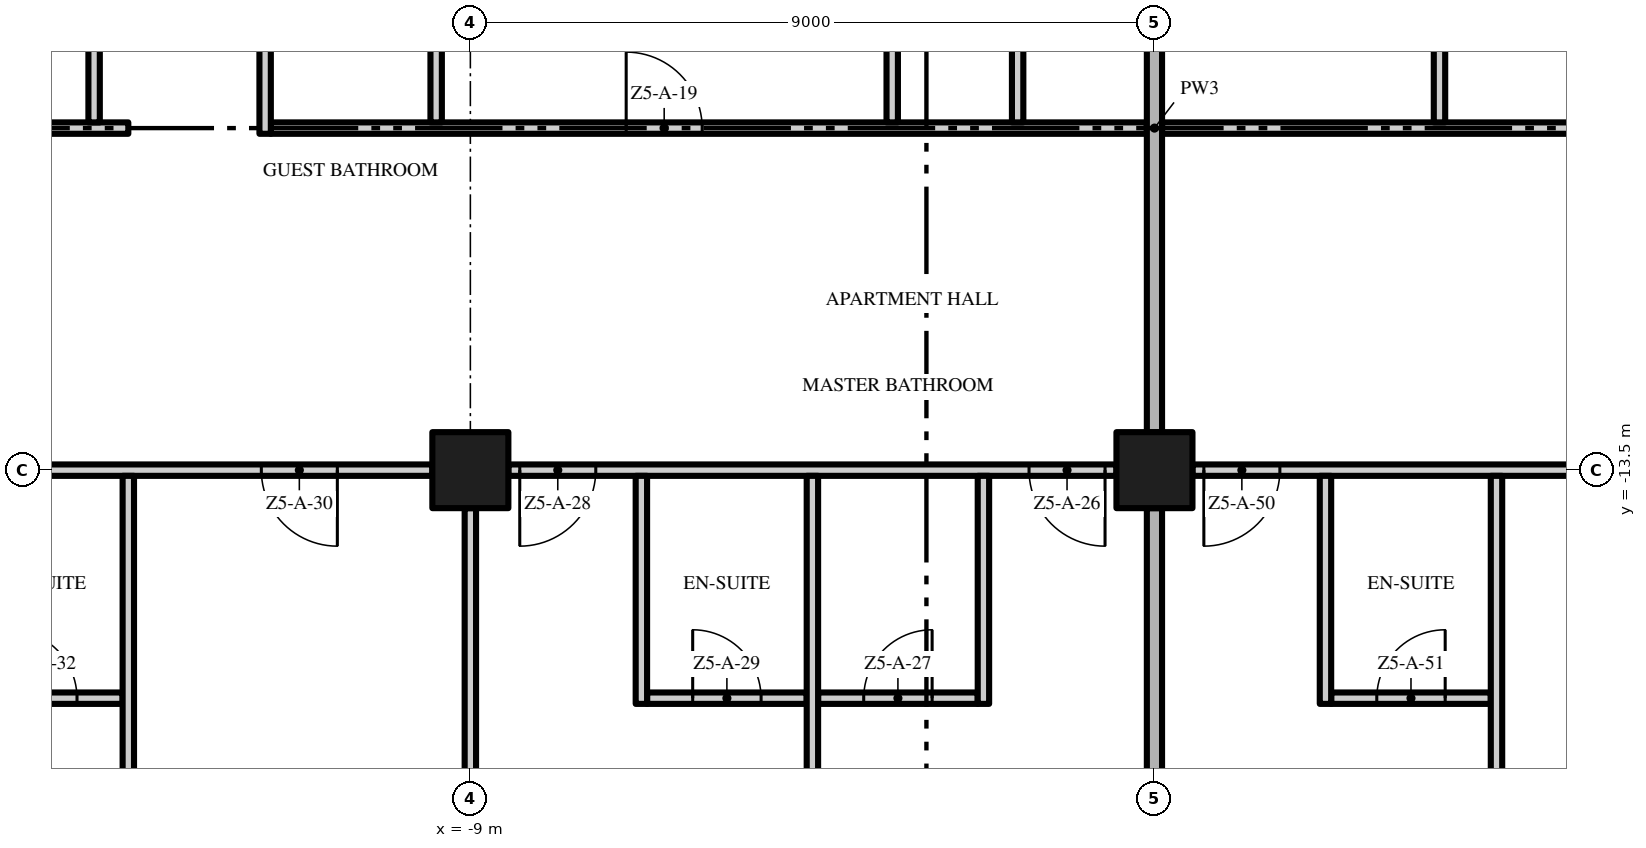
"""IFC4 building model, lengths in metres.
Left out: names, types, materials, properties, quantities, classifications, styles, units other than length and angle.
Written with IfcOpenShell. Run it as: python <this file> out.ifc"""

import sys

from ifc_helpers import new_model, si_unit, direction, frame, frame_2d, origin, origin_2d, place, context, subcontext, project, spatial, rectangle, extrude, element, fill, save


model = new_model("IFC4")
c1 = context("Model", 3, precision=1e-05, world=origin(), true_north=direction((0.0, 1.0)))
c2 = subcontext(c1, "Body", "Model", "MODEL_VIEW")
j1 = project(units=[si_unit("LENGTHUNIT", "METRE"), si_unit("PLANEANGLEUNIT", "RADIAN")], contexts=[c1])
p1 = place(None, origin())
s1 = spatial("IfcSite", under=j1, at=p1, CompositionType="ELEMENT")
p2 = place(p1, origin())
s2 = spatial("IfcBuilding", under=s1, at=p2, CompositionType="ELEMENT")
p3 = place(p2, frame((0.0, 0.0, 238.8)))
s3 = spatial("IfcBuildingStorey", under=s2, at=p3, CompositionType="ELEMENT", Elevation=238.8)
for number, where, z_axis, x_axis in (
    (1, (-9.0, -13.5, 0.0), (0.0, 0.0, 1.0), (1.0, 0.0, 0.0)),
    (2, (0.0, -13.5, 0.0), (0.0, 0.0, 1.0), (1.0, 0.0, 0.0)),
):
    element("IfcColumn", number, at=place(p3, frame(where, z_axis=z_axis, x_axis=x_axis)), inside=s3, PredefinedType="COLUMN", context=c2, shape_type="SweptSolid", body=[
        extrude(rectangle(XDim=1.0, YDim=1.0, at=origin_2d()), origin(), (0.0, 0.0, 1.0), 3.5),
    ])
p4 = place(p3, frame((-15.675, -16.5, 0.0), z_axis=(0.0, 0.0, 1.0), x_axis=(1.0, 0.0, 0.0)))
e3 = element("IfcWall", 3, at=p4, inside=s3, PredefinedType="PARTITIONING", context=c2, shape_type="SweptSolid", body=[
    extrude(rectangle(XDim=2.1, YDim=0.15, at=frame_2d((1.05, 0.0))), origin(), (0.0, 0.0, 1.0), 3.5),
])
p5 = place(p4, frame((0.6, 0.0, 0.0)))
e4 = element("IfcOpeningElement", 4, at=p5, cuts=e3, PredefinedType="OPENING", context=c2, shape_type="SweptSolid", body=[
    extrude(rectangle(XDim=0.9, YDim=2.1, at=frame_2d((0.45, 1.05))), frame((0.0, 0.085, 0.0), z_axis=(0.0, -1.0, 0.0), x_axis=(1.0, 0.0, 0.0)), (0.0, 0.0, 1.0), 0.17),
])
p6 = place(p3, frame((-6.675, -16.5, 0.0), z_axis=(0.0, 0.0, 1.0), x_axis=(1.0, 0.0, 0.0)))
e5 = element("IfcWall", 5, at=p6, inside=s3, PredefinedType="PARTITIONING", context=c2, shape_type="SweptSolid", body=[
    extrude(rectangle(XDim=2.1, YDim=0.15, at=frame_2d((1.05, 0.0))), origin(), (0.0, 0.0, 1.0), 3.5),
])
p7 = place(p6, frame((0.6, 0.0, 0.0)))
e6 = element("IfcOpeningElement", 6, at=p7, cuts=e5, PredefinedType="OPENING", context=c2, shape_type="SweptSolid", body=[
    extrude(rectangle(XDim=0.9, YDim=2.1, at=frame_2d((0.45, 1.05))), frame((0.0, 0.085, 0.0), z_axis=(0.0, -1.0, 0.0), x_axis=(1.0, 0.0, 0.0)), (0.0, 0.0, 1.0), 0.17),
])
p8 = place(p3, frame((-4.425, -16.5, 0.0), z_axis=(0.0, 0.0, 1.0), x_axis=(1.0, 0.0, 0.0)))
e7 = element("IfcWall", 7, at=p8, inside=s3, PredefinedType="PARTITIONING", context=c2, shape_type="SweptSolid", body=[
    extrude(rectangle(XDim=2.1, YDim=0.15, at=frame_2d((1.05, 0.0))), origin(), (0.0, 0.0, 1.0), 3.5),
])
p9 = place(p8, frame((0.6, 0.0, 0.0)))
e8 = element("IfcOpeningElement", 8, at=p9, cuts=e7, PredefinedType="OPENING", context=c2, shape_type="SweptSolid", body=[
    extrude(rectangle(XDim=0.9, YDim=2.1, at=frame_2d((0.45, 1.05))), frame((0.0, 0.085, 0.0), z_axis=(0.0, -1.0, 0.0), x_axis=(1.0, 0.0, 0.0)), (0.0, 0.0, 1.0), 0.17),
])
p10 = place(p3, frame((2.325, -16.5, 0.0), z_axis=(0.0, 0.0, 1.0), x_axis=(1.0, 0.0, 0.0)))
e9 = element("IfcWall", 9, at=p10, inside=s3, PredefinedType="PARTITIONING", context=c2, shape_type="SweptSolid", body=[
    extrude(rectangle(XDim=2.1, YDim=0.15, at=frame_2d((1.05, 0.0))), origin(), (0.0, 0.0, 1.0), 3.5),
])
p11 = place(p10, frame((0.6, 0.0, 0.0)))
e10 = element("IfcOpeningElement", 10, at=p11, cuts=e9, PredefinedType="OPENING", context=c2, shape_type="SweptSolid", body=[
    extrude(rectangle(XDim=0.9, YDim=2.1, at=frame_2d((0.45, 1.05))), frame((0.0, 0.085, 0.0), z_axis=(0.0, -1.0, 0.0), x_axis=(1.0, 0.0, 0.0)), (0.0, 0.0, 1.0), 0.17),
])
p12 = place(p3, frame((-9.5, -13.5, 0.0), z_axis=(0.0, 0.0, 1.0), x_axis=(-1.0, 0.0, 0.0)))
e11 = element("IfcWall", 11, at=p12, inside=s3, PredefinedType="PARTITIONING", context=c2, shape_type="SweptSolid", body=[
    extrude(rectangle(XDim=8.0, YDim=0.15, at=frame_2d((4.0, 0.0))), origin(), (0.0, 0.0, 1.0), 3.5),
])
p13 = place(p12, frame((1.25, 0.0, 0.0)))
e12 = element("IfcOpeningElement", 12, at=p13, cuts=e11, PredefinedType="OPENING", context=c2, shape_type="SweptSolid", body=[
    extrude(rectangle(XDim=1.0, YDim=2.4, at=frame_2d((0.5, 1.2))), frame((0.0, 0.085, 0.0), z_axis=(0.0, -1.0, 0.0), x_axis=(1.0, 0.0, 0.0)), (0.0, 0.0, 1.0), 0.17),
])
p14 = place(p12, frame((6.85, 0.0, 0.0)))
e13 = element("IfcOpeningElement", 13, at=p14, cuts=e11, PredefinedType="OPENING", context=c2, shape_type="SweptSolid", body=[
    extrude(rectangle(XDim=1.0, YDim=2.4, at=frame_2d((0.5, 1.2))), frame((0.0, 0.085, 0.0), z_axis=(0.0, -1.0, 0.0), x_axis=(1.0, 0.0, 0.0)), (0.0, 0.0, 1.0), 0.17),
])
p15 = place(p3, frame((-0.5, -13.5, 0.0), z_axis=(0.0, 0.0, 1.0), x_axis=(-1.0, 0.0, 0.0)))
e14 = element("IfcWall", 14, at=p15, inside=s3, PredefinedType="PARTITIONING", context=c2, shape_type="SweptSolid", body=[
    extrude(rectangle(XDim=8.0, YDim=0.15, at=frame_2d((4.0, 0.0))), origin(), (0.0, 0.0, 1.0), 3.5),
])
p16 = place(p15, frame((0.15, 0.0, 0.0)))
e15 = element("IfcOpeningElement", 15, at=p16, cuts=e14, PredefinedType="OPENING", context=c2, shape_type="SweptSolid", body=[
    extrude(rectangle(XDim=1.0, YDim=2.4, at=frame_2d((0.5, 1.2))), frame((0.0, 0.085, 0.0), z_axis=(0.0, -1.0, 0.0), x_axis=(1.0, 0.0, 0.0)), (0.0, 0.0, 1.0), 0.17),
])
p17 = place(p15, frame((6.85, 0.0, 0.0)))
e16 = element("IfcOpeningElement", 16, at=p17, cuts=e14, PredefinedType="OPENING", context=c2, shape_type="SweptSolid", body=[
    extrude(rectangle(XDim=1.0, YDim=2.4, at=frame_2d((0.5, 1.2))), frame((0.0, 0.085, 0.0), z_axis=(0.0, -1.0, 0.0), x_axis=(1.0, 0.0, 0.0)), (0.0, 0.0, 1.0), 0.17),
])
p18 = place(p3, frame((8.5, -13.5, 0.0), z_axis=(0.0, 0.0, 1.0), x_axis=(-1.0, 0.0, 0.0)))
e17 = element("IfcWall", 17, at=p18, inside=s3, PredefinedType="PARTITIONING", context=c2, shape_type="SweptSolid", body=[
    extrude(rectangle(XDim=8.0, YDim=0.15, at=frame_2d((4.0, 0.0))), origin(), (0.0, 0.0, 1.0), 3.5),
])
p19 = place(p18, frame((1.25, 0.0, 0.0)))
e18 = element("IfcOpeningElement", 18, at=p19, cuts=e17, PredefinedType="OPENING", context=c2, shape_type="SweptSolid", body=[
    extrude(rectangle(XDim=1.0, YDim=2.4, at=frame_2d((0.5, 1.2))), frame((0.0, 0.085, 0.0), z_axis=(0.0, -1.0, 0.0), x_axis=(1.0, 0.0, 0.0)), (0.0, 0.0, 1.0), 0.17),
])
p20 = place(p18, frame((6.85, 0.0, 0.0)))
e19 = element("IfcOpeningElement", 19, at=p20, cuts=e17, PredefinedType="OPENING", context=c2, shape_type="SweptSolid", body=[
    extrude(rectangle(XDim=1.0, YDim=2.4, at=frame_2d((0.5, 1.2))), frame((0.0, 0.085, 0.0), z_axis=(0.0, -1.0, 0.0), x_axis=(1.0, 0.0, 0.0)), (0.0, 0.0, 1.0), 0.17),
])
p21 = place(p3, frame((-26.7, -9.0, 0.0), z_axis=(0.0, 0.0, 1.0), x_axis=(1.0, 0.0, 0.0)))
e20 = element("IfcWall", 20, at=p21, inside=s3, PredefinedType="PARTITIONING", context=c2, shape_type="SweptSolid", body=[
    extrude(rectangle(XDim=13.2, YDim=0.15, at=frame_2d((6.6, 0.0))), origin(), (0.0, 0.0, 1.0), 3.5),
])
p22 = place(p3, frame((-11.625, -9.0, 0.0), z_axis=(0.0, 0.0, 1.0), x_axis=(1.0, 0.0, 0.0)))
e21 = element("IfcWall", 21, at=p22, inside=s3, PredefinedType="PARTITIONING", context=c2, shape_type="SweptSolid", body=[
    extrude(rectangle(XDim=11.525, YDim=0.15, at=frame_2d((5.763, 0.0))), origin(), (0.0, 0.0, 1.0), 3.5),
])
p23 = place(p22, frame((4.675, 0.0, 0.0)))
e22 = element("IfcOpeningElement", 22, at=p23, cuts=e21, PredefinedType="OPENING", context=c2, shape_type="SweptSolid", body=[
    extrude(rectangle(XDim=1.0, YDim=2.4, at=frame_2d((0.5, 1.2))), frame((0.0, 0.085, 0.0), z_axis=(0.0, -1.0, 0.0), x_axis=(1.0, 0.0, 0.0)), (0.0, 0.0, 1.0), 0.17),
])
p24 = place(p3, frame((0.1, -9.0, 0.0), z_axis=(0.0, 0.0, 1.0), x_axis=(1.0, 0.0, 0.0)))
e23 = element("IfcWall", 23, at=p24, inside=s3, PredefinedType="PARTITIONING", context=c2, shape_type="SweptSolid", body=[
    extrude(rectangle(XDim=8.825, YDim=0.15, at=frame_2d((4.412, 0.0))), origin(), (0.0, 0.0, 1.0), 3.5),
])
p25 = place(p24, frame((5.8, 0.0, 0.0)))
e24 = element("IfcOpeningElement", 24, at=p25, cuts=e23, PredefinedType="OPENING", context=c2, shape_type="SweptSolid", body=[
    extrude(rectangle(XDim=0.9, YDim=2.1, at=frame_2d((0.45, 1.05))), frame((0.0, 0.085, 0.0), z_axis=(0.0, -1.0, 0.0), x_axis=(1.0, 0.0, 0.0)), (0.0, 0.0, 1.0), 0.17),
])
p26 = place(p3, frame((-13.95, -8.925, 0.0), z_axis=(0.0, 0.0, 1.0), x_axis=(0.0, 1.0, 0.0)))
e25 = element("IfcWall", 25, at=p26, inside=s3, PredefinedType="PARTITIONING", context=c2, shape_type="SweptSolid", body=[
    extrude(rectangle(XDim=4.5, YDim=0.15, at=frame_2d((2.25, 0.0))), origin(), (0.0, 0.0, 1.0), 3.5),
])
p27 = place(p3, frame((-13.5, -22.2, 0.0), z_axis=(0.0, 0.0, 1.0), x_axis=(0.0, 1.0, 0.0)))
e26 = element("IfcWall", 26, at=p27, inside=s3, PredefinedType="PARTITIONING", context=c2, shape_type="SweptSolid", body=[
    extrude(rectangle(XDim=8.625, YDim=0.15, at=frame_2d((4.312, 0.0))), origin(), (0.0, 0.0, 1.0), 3.5),
])
p28 = place(p3, frame((-11.7, -4.425, 0.0), z_axis=(0.0, 0.0, 1.0), x_axis=(0.0, -1.0, 0.0)))
e27 = element("IfcWall", 27, at=p28, inside=s3, PredefinedType="PARTITIONING", context=c2, shape_type="SweptSolid", body=[
    extrude(rectangle(XDim=4.65, YDim=0.15, at=frame_2d((2.325, 0.0))), origin(), (0.0, 0.0, 1.0), 3.5),
])
p29 = place(p28, frame((1.875, 0.0, 0.0)))
e28 = element("IfcOpeningElement", 28, at=p29, cuts=e27, PredefinedType="OPENING", context=c2, shape_type="SweptSolid", body=[
    extrude(rectangle(XDim=0.9, YDim=2.1, at=frame_2d((0.45, 1.05))), frame((0.0, 0.085, 0.0), z_axis=(0.0, -1.0, 0.0), x_axis=(1.0, 0.0, 0.0)), (0.0, 0.0, 1.0), 0.17),
])
p30 = place(p3, frame((-9.45, -8.925, 0.0), z_axis=(0.0, 0.0, 1.0), x_axis=(0.0, 1.0, 0.0)))
e29 = element("IfcWall", 29, at=p30, inside=s3, PredefinedType="PARTITIONING", context=c2, shape_type="SweptSolid", body=[
    extrude(rectangle(XDim=3.925, YDim=0.15, at=frame_2d((1.962, 0.0))), origin(), (0.0, 0.0, 1.0), 3.5),
])
p31 = place(p3, frame((-9.0, -21.6, 0.0), z_axis=(0.0, 0.0, 1.0), x_axis=(0.0, 1.0, 0.0)))
e30 = element("IfcWall", 30, at=p31, inside=s3, PredefinedType="PARTITIONING", context=c2, shape_type="SweptSolid", body=[
    extrude(rectangle(XDim=7.6, YDim=0.15, at=frame_2d((3.8, 0.0))), origin(), (0.0, 0.0, 1.0), 3.5),
])
p32 = place(p3, frame((-6.75, -16.575, 0.0), z_axis=(0.0, 0.0, 1.0), x_axis=(0.0, 1.0, 0.0)))
e31 = element("IfcWall", 31, at=p32, inside=s3, PredefinedType="PARTITIONING", context=c2, shape_type="SweptSolid", body=[
    extrude(rectangle(XDim=3.0, YDim=0.15, at=frame_2d((1.5, 0.0))), origin(), (0.0, 0.0, 1.0), 3.5),
])
p33 = place(p3, frame((-4.5, -22.2, 0.0), z_axis=(0.0, 0.0, 1.0), x_axis=(0.0, 1.0, 0.0)))
e32 = element("IfcWall", 32, at=p33, inside=s3, PredefinedType="PARTITIONING", context=c2, shape_type="SweptSolid", body=[
    extrude(rectangle(XDim=8.625, YDim=0.15, at=frame_2d((4.312, 0.0))), origin(), (0.0, 0.0, 1.0), 3.5),
])
p34 = place(p3, frame((-3.45, -8.925, 0.0), z_axis=(0.0, 0.0, 1.0), x_axis=(0.0, 1.0, 0.0)))
e33 = element("IfcWall", 33, at=p34, inside=s3, PredefinedType="PARTITIONING", context=c2, shape_type="SweptSolid", body=[
    extrude(rectangle(XDim=4.35, YDim=0.15, at=frame_2d((2.175, 0.0))), origin(), (0.0, 0.0, 1.0), 3.5),
])
p35 = place(p3, frame((-2.25, -16.575, 0.0), z_axis=(0.0, 0.0, 1.0), x_axis=(0.0, 1.0, 0.0)))
e34 = element("IfcWall", 34, at=p35, inside=s3, PredefinedType="PARTITIONING", context=c2, shape_type="SweptSolid", body=[
    extrude(rectangle(XDim=3.0, YDim=0.15, at=frame_2d((1.5, 0.0))), origin(), (0.0, 0.0, 1.0), 3.5),
])
p36 = place(p3, frame((-1.8, -8.925, 0.0), z_axis=(0.0, 0.0, 1.0), x_axis=(0.0, 1.0, 0.0)))
e35 = element("IfcWall", 35, at=p36, inside=s3, PredefinedType="PARTITIONING", context=c2, shape_type="SweptSolid", body=[
    extrude(rectangle(XDim=4.35, YDim=0.15, at=frame_2d((2.175, 0.0))), origin(), (0.0, 0.0, 1.0), 3.5),
])
p37 = place(p3, frame((0.0, -21.6, 0.0), z_axis=(0.0, 0.0, 1.0), x_axis=(0.0, 1.0, 0.0)))
e36 = element("IfcWall", 36, at=p37, inside=s3, PredefinedType="PARTITIONING", context=c2, shape_type="SweptSolid", body=[
    extrude(rectangle(XDim=7.6, YDim=0.2, at=frame_2d((3.8, 0.0))), origin(), (0.0, 0.0, 1.0), 3.5),
])
p38 = place(p3, frame((0.0, -13.0, 0.0), z_axis=(0.0, 0.0, 1.0), x_axis=(0.0, 1.0, 0.0)))
e37 = element("IfcWall", 37, at=p38, inside=s3, PredefinedType="PARTITIONING", context=c2, shape_type="SweptSolid", body=[
    extrude(rectangle(XDim=8.0, YDim=0.2, at=frame_2d((4.0, 0.0))), origin(), (0.0, 0.0, 1.0), 3.5),
])
p39 = place(p3, frame((2.25, -16.575, 0.0), z_axis=(0.0, 0.0, 1.0), x_axis=(0.0, 1.0, 0.0)))
e38 = element("IfcWall", 38, at=p39, inside=s3, PredefinedType="PARTITIONING", context=c2, shape_type="SweptSolid", body=[
    extrude(rectangle(XDim=3.0, YDim=0.15, at=frame_2d((1.5, 0.0))), origin(), (0.0, 0.0, 1.0), 3.5),
])
p40 = place(p3, frame((3.75, -8.925, 0.0), z_axis=(0.0, 0.0, 1.0), x_axis=(0.0, 1.0, 0.0)))
e39 = element("IfcWall", 39, at=p40, inside=s3, PredefinedType="PARTITIONING", context=c2, shape_type="SweptSolid", body=[
    extrude(rectangle(XDim=4.35, YDim=0.15, at=frame_2d((2.175, 0.0))), origin(), (0.0, 0.0, 1.0), 3.5),
])
p41 = place(p40, frame((1.75, 0.0, 0.0)))
e40 = element("IfcOpeningElement", 40, at=p41, cuts=e39, PredefinedType="OPENING", context=c2, shape_type="SweptSolid", body=[
    extrude(rectangle(XDim=0.9, YDim=2.1, at=frame_2d((0.45, 1.05))), frame((0.0, 0.085, 0.0), z_axis=(0.0, -1.0, 0.0), x_axis=(1.0, 0.0, 0.0)), (0.0, 0.0, 1.0), 0.17),
])
p42 = place(p3, frame((4.5, -22.2, 0.0), z_axis=(0.0, 0.0, 1.0), x_axis=(0.0, 1.0, 0.0)))
e41 = element("IfcWall", 41, at=p42, inside=s3, PredefinedType="PARTITIONING", context=c2, shape_type="SweptSolid", body=[
    extrude(rectangle(XDim=8.625, YDim=0.15, at=frame_2d((4.312, 0.0))), origin(), (0.0, 0.0, 1.0), 3.5),
])
p43 = place(p23, origin())
e42 = element("IfcDoor", 42, at=p43, inside=s3, OperationType="SINGLE_SWING_LEFT", PredefinedType="DOOR", context=c2, shape_type="SweptSolid", body=[
    extrude(rectangle(XDim=1.0, YDim=2.4, at=frame_2d((0.5, 1.2))), frame((0.0, 0.025, 0.0), z_axis=(0.0, -1.0, 0.0), x_axis=(1.0, 0.0, 0.0)), (0.0, 0.0, 1.0), 0.05),
])
fill(e22, e42)
p44 = place(p16, origin())
e43 = element("IfcDoor", 43, at=p44, inside=s3, OperationType="SINGLE_SWING_LEFT", PredefinedType="DOOR", context=c2, shape_type="SweptSolid", body=[
    extrude(rectangle(XDim=1.0, YDim=2.4, at=frame_2d((0.5, 1.2))), frame((0.0, 0.025, 0.0), z_axis=(0.0, -1.0, 0.0), x_axis=(1.0, 0.0, 0.0)), (0.0, 0.0, 1.0), 0.05),
])
fill(e15, e43)
p45 = place(p9, origin())
e44 = element("IfcDoor", 44, at=p45, inside=s3, OperationType="SINGLE_SWING_RIGHT", PredefinedType="DOOR", context=c2, shape_type="SweptSolid", body=[
    extrude(rectangle(XDim=0.9, YDim=2.1, at=frame_2d((0.45, 1.05))), frame((0.0, 0.025, 0.0), z_axis=(0.0, -1.0, 0.0), x_axis=(1.0, 0.0, 0.0)), (0.0, 0.0, 1.0), 0.05),
])
fill(e8, e44)
p46 = place(p17, origin())
e45 = element("IfcDoor", 45, at=p46, inside=s3, OperationType="SINGLE_SWING_RIGHT", PredefinedType="DOOR", context=c2, shape_type="SweptSolid", body=[
    extrude(rectangle(XDim=1.0, YDim=2.4, at=frame_2d((0.5, 1.2))), frame((0.0, 0.025, 0.0), z_axis=(0.0, -1.0, 0.0), x_axis=(1.0, 0.0, 0.0)), (0.0, 0.0, 1.0), 0.05),
])
fill(e16, e45)
p47 = place(p7, origin())
e46 = element("IfcDoor", 46, at=p47, inside=s3, OperationType="SINGLE_SWING_LEFT", PredefinedType="DOOR", context=c2, shape_type="SweptSolid", body=[
    extrude(rectangle(XDim=0.9, YDim=2.1, at=frame_2d((0.45, 1.05))), frame((0.0, 0.025, 0.0), z_axis=(0.0, -1.0, 0.0), x_axis=(1.0, 0.0, 0.0)), (0.0, 0.0, 1.0), 0.05),
])
fill(e6, e46)
p48 = place(p13, origin())
e47 = element("IfcDoor", 47, at=p48, inside=s3, OperationType="SINGLE_SWING_LEFT", PredefinedType="DOOR", context=c2, shape_type="SweptSolid", body=[
    extrude(rectangle(XDim=1.0, YDim=2.4, at=frame_2d((0.5, 1.2))), frame((0.0, 0.025, 0.0), z_axis=(0.0, -1.0, 0.0), x_axis=(1.0, 0.0, 0.0)), (0.0, 0.0, 1.0), 0.05),
])
fill(e12, e47)
p49 = place(p5, origin())
e48 = element("IfcDoor", 48, at=p49, inside=s3, OperationType="SINGLE_SWING_LEFT", PredefinedType="DOOR", context=c2, shape_type="SweptSolid", body=[
    extrude(rectangle(XDim=0.9, YDim=2.1, at=frame_2d((0.45, 1.05))), frame((0.0, 0.025, 0.0), z_axis=(0.0, -1.0, 0.0), x_axis=(1.0, 0.0, 0.0)), (0.0, 0.0, 1.0), 0.05),
])
fill(e4, e48)
p50 = place(p20, origin())
e49 = element("IfcDoor", 49, at=p50, inside=s3, OperationType="SINGLE_SWING_RIGHT", PredefinedType="DOOR", context=c2, shape_type="SweptSolid", body=[
    extrude(rectangle(XDim=1.0, YDim=2.4, at=frame_2d((0.5, 1.2))), frame((0.0, 0.025, 0.0), z_axis=(0.0, -1.0, 0.0), x_axis=(1.0, 0.0, 0.0)), (0.0, 0.0, 1.0), 0.05),
])
fill(e19, e49)
p51 = place(p11, origin())
e50 = element("IfcDoor", 50, at=p51, inside=s3, OperationType="SINGLE_SWING_RIGHT", PredefinedType="DOOR", context=c2, shape_type="SweptSolid", body=[
    extrude(rectangle(XDim=0.9, YDim=2.1, at=frame_2d((0.45, 1.05))), frame((0.0, 0.025, 0.0), z_axis=(0.0, -1.0, 0.0), x_axis=(1.0, 0.0, 0.0)), (0.0, 0.0, 1.0), 0.05),
])
fill(e10, e50)
save(model, sys.argv[1])
